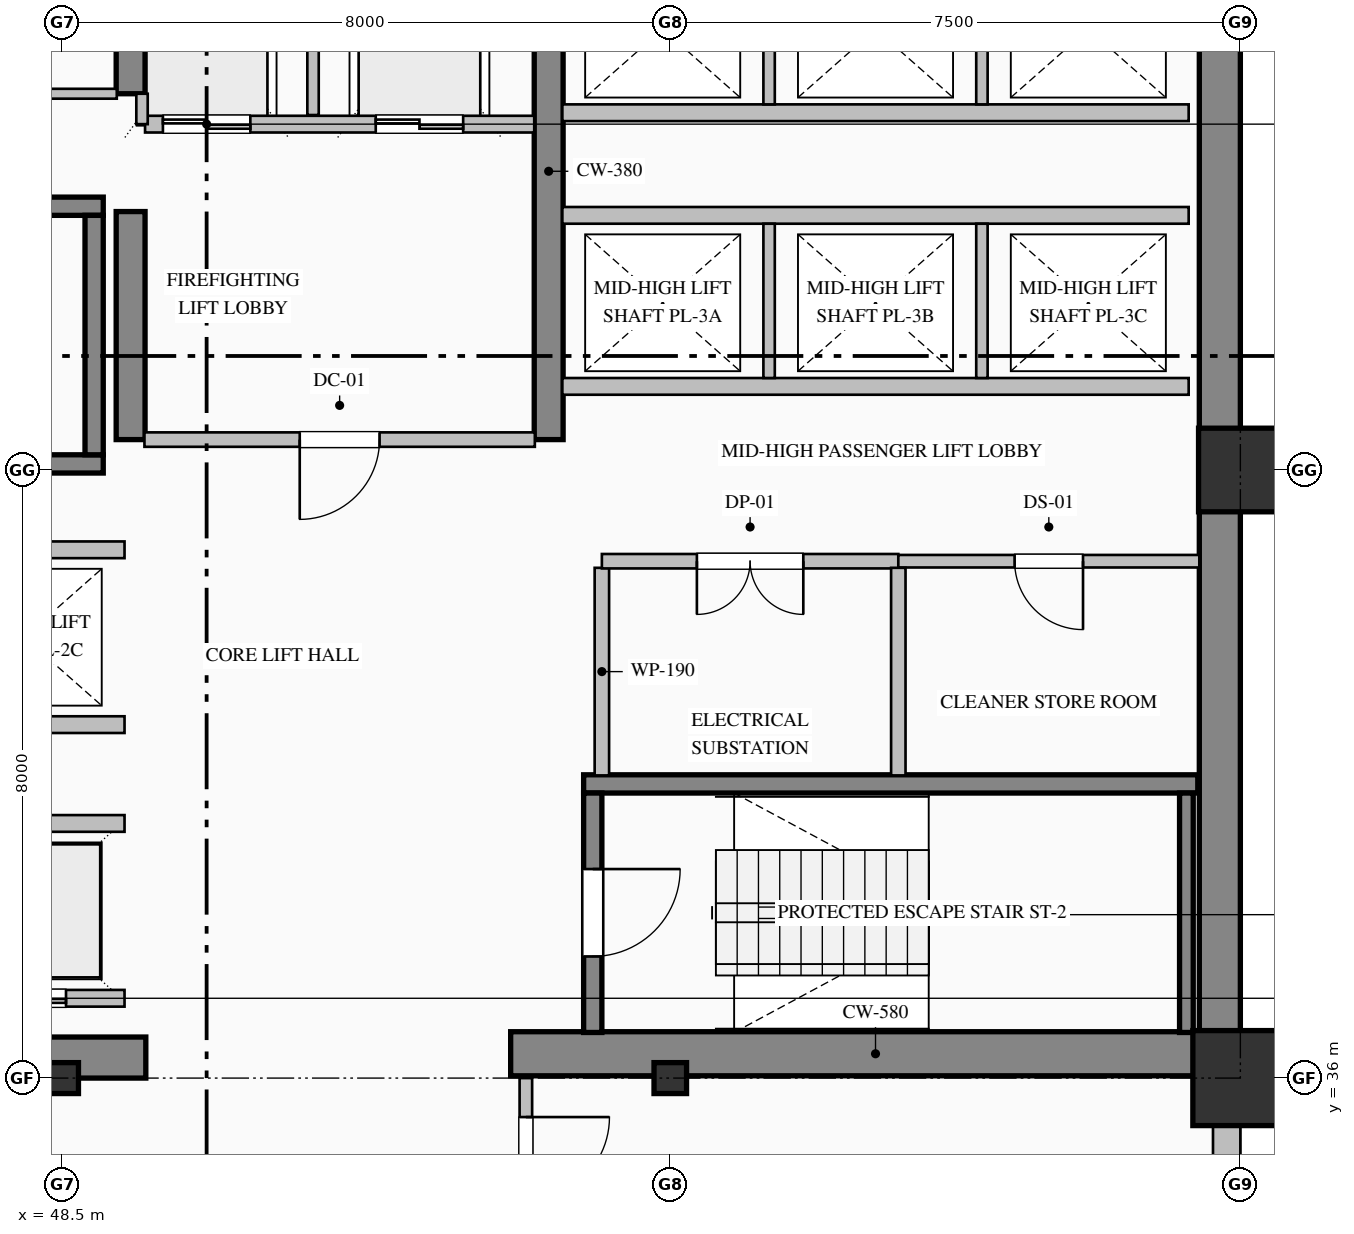
"""IFC4 building model, lengths in metres.
Left out: names, types, materials, properties, quantities, classifications, styles, units other than length and angle.
Written with IfcOpenShell. Run it as: python <this file> out.ifc"""

import sys

from ifc_helpers import new_model, si_unit, direction, frame, frame_2d, origin, origin_2d, place, context, subcontext, project, spatial, rectangle, hollow_rectangle, i_section, extrude, element, fill, save


model = new_model("IFC4")
c1 = context("Model", 3, precision=1e-05, world=origin(), true_north=direction((0.0, 1.0)))
c2 = subcontext(c1, "Body", "Model", "MODEL_VIEW")
j1 = project(units=[si_unit("LENGTHUNIT", "METRE"), si_unit("PLANEANGLEUNIT", "RADIAN")], contexts=[c1])
p1 = place(None, origin())
s1 = spatial("IfcSite", under=j1, at=p1, CompositionType="ELEMENT")
p2 = place(p1, origin())
s2 = spatial("IfcBuilding", under=s1, at=p2, CompositionType="ELEMENT")
p3 = place(p2, frame((0.0, 0.0, 36.2)))
s3 = spatial("IfcBuildingStorey", under=s2, at=p3, CompositionType="ELEMENT", Elevation=36.2)
p4 = place(p3, frame((63.73, 36.32, 0.0), z_axis=(0.0, 0.0, 1.0), x_axis=(0.0, 1.0, 0.0)))
e1 = element("IfcWall", 1, at=p4, inside=s3, PredefinedType="SHEAR", context=c2, shape_type="SweptSolid", body=[
    extrude(rectangle(XDim=15.14, YDim=0.54, at=frame_2d((7.57, 0.0))), origin(), (0.0, 0.0, 1.0), 3.75),
])
p5 = place(p3, frame((48.2, 36.27, 0.0), z_axis=(0.0, 0.0, 1.0), x_axis=(1.0, 0.0, 0.0)))
e2 = element("IfcWall", 2, at=p5, inside=s3, PredefinedType="SHEAR", context=c2, shape_type="SweptSolid", body=[
    extrude(rectangle(XDim=1.4, YDim=0.54, at=frame_2d((0.7, 0.0))), origin(), (0.0, 0.0, 1.0), 3.75),
])
p6 = place(p3, frame((54.4, 36.32, 0.0), z_axis=(0.0, 0.0, 1.0), x_axis=(1.0, 0.0, 0.0)))
e3 = element("IfcWall", 3, at=p6, inside=s3, PredefinedType="SHEAR", context=c2, shape_type="SweptSolid", body=[
    extrude(rectangle(XDim=9.6, YDim=0.58, at=frame_2d((4.8, 0.0))), origin(), (0.0, 0.0, 1.0), 4.0),
])
p7 = place(p3, frame((49.4, 44.4, 0.0), z_axis=(0.0, 0.0, 1.0), x_axis=(0.0, 1.0, 0.0)))
e4 = element("IfcWall", 4, at=p7, inside=s3, PredefinedType="SHEAR", context=c2, shape_type="SweptSolid", body=[
    extrude(rectangle(XDim=3.0, YDim=0.38, at=frame_2d((1.5, 0.0))), origin(), (0.0, 0.0, 1.0), 3.75),
])
p8 = place(p3, frame((49.4, 48.95, 0.0), z_axis=(0.0, 0.0, 1.0), x_axis=(0.0, 1.0, 0.0)))
e5 = element("IfcWall", 5, at=p8, inside=s3, PredefinedType="SHEAR", context=c2, shape_type="SweptSolid", body=[
    extrude(rectangle(XDim=2.51, YDim=0.38, at=frame_2d((1.255, 0.0))), origin(), (0.0, 0.0, 1.0), 3.75),
])
p9 = place(p3, frame((54.9, 44.4, 0.0), z_axis=(0.0, 0.0, 1.0), x_axis=(0.0, 1.0, 0.0)))
e6 = element("IfcWall", 6, at=p9, inside=s3, PredefinedType="SHEAR", context=c2, shape_type="SweptSolid", body=[
    extrude(rectangle(XDim=7.06, YDim=0.38, at=frame_2d((3.53, 0.0))), origin(), (0.0, 0.0, 1.0), 3.75),
])
for number, where, z_axis, x_axis in (
    (7, (48.5, 36.0, 0.0), (0.0, 0.0, 1.0), (1.0, 0.0, 0.0)),
    (8, (56.5, 36.0, 0.0), (0.0, 0.0, 1.0), (1.0, 0.0, 0.0)),
):
    element("IfcColumn", number, at=place(p3, frame(where, z_axis=z_axis, x_axis=x_axis)), inside=s3, PredefinedType="COLUMN", context=c2, shape_type="SweptSolid", body=[
        extrude(i_section(OverallWidth=0.407, OverallDepth=0.428, WebThickness=0.02, FlangeThickness=0.035, FilletRadius=0.022, at=origin_2d()), origin(), (0.0, 0.0, 1.0), 4.0),
    ])
p10 = place(p3, frame((64.0, 36.0, 0.0), z_axis=(0.0, 0.0, 1.0), x_axis=(1.0, 0.0, 0.0)))
e9 = element("IfcColumn", 9, at=p10, inside=s3, PredefinedType="COLUMN", context=c2, shape_type="SweptSolid", body=[
    extrude(hollow_rectangle(XDim=1.25, YDim=1.25, WallThickness=0.045, at=origin_2d()), origin(), (0.0, 0.0, 1.0), 4.0),
])
p11 = place(p3, frame((64.0, 44.0, 0.0), z_axis=(0.0, 0.0, 1.0), x_axis=(1.0, 0.0, 0.0)))
e10 = element("IfcColumn", 10, at=p11, inside=s3, PredefinedType="COLUMN", context=c2, shape_type="SweptSolid", body=[
    extrude(hollow_rectangle(XDim=1.1, YDim=1.1, WallThickness=0.04, at=origin_2d()), origin(), (0.0, 0.0, 1.0), 4.0),
])
p12 = place(p3, frame((63.82, 36.05, 0.0), z_axis=(0.0, 0.0, 1.0), x_axis=(0.0, -1.0, 0.0)))
e11 = element("IfcWall", 11, at=p12, inside=s3, PredefinedType="SOLIDWALL", context=c2, shape_type="SweptSolid", body=[
    extrude(rectangle(XDim=28.05, YDim=0.36, at=frame_2d((14.025, 0.0))), origin(), (0.0, 0.0, 1.0), 3.25),
])
p13 = place(p12, frame((9.75, 0.0, 0.85)))
e12 = element("IfcOpeningElement", 12, at=p13, cuts=e11, PredefinedType="OPENING", context=c2, shape_type="SweptSolid", body=[
    extrude(rectangle(XDim=2.1, YDim=2.05, at=frame_2d((1.05, 1.025))), frame((0.0, 0.19, 0.0), z_axis=(0.0, -1.0, 0.0), x_axis=(1.0, 0.0, 0.0)), (0.0, 0.0, 1.0), 0.38),
])
p14 = place(p12, frame((13.2, 0.0, 0.8)))
e13 = element("IfcOpeningElement", 13, at=p14, cuts=e11, PredefinedType="OPENING", context=c2, shape_type="SweptSolid", body=[
    extrude(rectangle(XDim=2.4, YDim=2.15, at=frame_2d((1.2, 1.075))), frame((0.0, 0.19, 0.0), z_axis=(0.0, -1.0, 0.0), x_axis=(1.0, 0.0, 0.0)), (0.0, 0.0, 1.0), 0.38),
])
for number, where, z_axis, x_axis in (
    (14, (40.96, 47.47, 0.0), (0.0, 0.0, 1.0), (1.0, 0.0, 0.0)),
    (15, (49.04, 44.08, 0.0), (0.0, 0.0, 1.0), (-1.0, 0.0, 0.0)),
):
    element("IfcWall", number, at=place(p3, frame(where, z_axis=z_axis, x_axis=x_axis)), inside=s3, PredefinedType="SOLIDWALL", context=c2, shape_type="SweptSolid", body=[
        extrude(rectangle(XDim=8.08, YDim=0.24, at=frame_2d((4.04, 0.0))), origin(), (0.0, 0.0, 1.0), 4.0),
    ])
p15 = place(p3, frame((48.92, 44.2, 0.0), z_axis=(0.0, 0.0, 1.0), x_axis=(0.0, 1.0, 0.0)))
e16 = element("IfcWall", 16, at=p15, inside=s3, PredefinedType="SOLIDWALL", context=c2, shape_type="SweptSolid", body=[
    extrude(rectangle(XDim=3.15, YDim=0.24, at=frame_2d((1.575, 0.0))), origin(), (0.0, 0.0, 1.0), 4.0),
])
p16 = place(p3, frame((55.36, 39.87, 0.0), z_axis=(0.0, 0.0, 1.0), x_axis=(1.0, 0.0, 0.0)))
e17 = element("IfcWall", 17, at=p16, inside=s3, PredefinedType="SOLIDWALL", context=c2, shape_type="SweptSolid", body=[
    extrude(rectangle(XDim=8.08, YDim=0.24, at=frame_2d((4.04, 0.0))), origin(), (0.0, 0.0, 1.0), 4.0),
])
p17 = place(p3, frame((55.48, 39.75, 0.0), z_axis=(0.0, 0.0, 1.0), x_axis=(0.0, -1.0, 0.0)))
e18 = element("IfcWall", 18, at=p17, inside=s3, PredefinedType="SOLIDWALL", context=c2, shape_type="SweptSolid", body=[
    extrude(rectangle(XDim=3.15, YDim=0.24, at=frame_2d((1.575, 0.0))), origin(), (0.0, 0.0, 1.0), 4.0),
])
p18 = place(p17, frame((1.0, 0.0, 0.0)))
e19 = element("IfcOpeningElement", 19, at=p18, cuts=e18, PredefinedType="OPENING", context=c2, shape_type="SweptSolid", body=[
    extrude(rectangle(XDim=1.15, YDim=2.2, at=frame_2d((0.575, 1.1))), frame((0.0, 0.13, 0.0), z_axis=(0.0, -1.0, 0.0), x_axis=(1.0, 0.0, 0.0)), (0.0, 0.0, 1.0), 0.26),
])
p19 = place(p3, frame((63.29, 36.6, 0.0), z_axis=(0.0, 0.0, 1.0), x_axis=(0.0, 1.0, 0.0)))
e20 = element("IfcWall", 20, at=p19, inside=s3, PredefinedType="SOLIDWALL", context=c2, shape_type="SweptSolid", body=[
    extrude(rectangle(XDim=3.15, YDim=0.18, at=frame_2d((1.575, 0.0))), origin(), (0.0, 0.0, 1.0), 4.0),
])
p20 = place(p3, frame((54.71, 48.55, 0.0), z_axis=(0.0, 0.0, 1.0), x_axis=(-1.0, 0.0, 0.0)))
e21 = element("IfcWall", 21, at=p20, inside=s3, PredefinedType="PARTITIONING", context=c2, shape_type="SweptSolid", body=[
    extrude(rectangle(XDim=5.12, YDim=0.22, at=frame_2d((2.56, 0.0))), origin(), (0.0, 0.0, 1.0), 3.75),
])
p21 = place(p20, frame((3.735, 0.0, 0.0)))
e22 = element("IfcOpeningElement", 22, at=p21, cuts=e21, PredefinedType="OPENING", context=c2, shape_type="SweptSolid", body=[
    extrude(rectangle(XDim=1.15, YDim=2.2, at=frame_2d((0.575, 1.1))), frame((0.0, 0.12, 0.0), z_axis=(0.0, -1.0, 0.0), x_axis=(1.0, 0.0, 0.0)), (0.0, 0.0, 1.0), 0.24),
])
p22 = place(p20, frame((0.935, 0.0, 0.0)))
e23 = element("IfcOpeningElement", 23, at=p22, cuts=e21, PredefinedType="OPENING", context=c2, shape_type="SweptSolid", body=[
    extrude(rectangle(XDim=1.15, YDim=2.2, at=frame_2d((0.575, 1.1))), frame((0.0, 0.12, 0.0), z_axis=(0.0, -1.0, 0.0), x_axis=(1.0, 0.0, 0.0)), (0.0, 0.0, 1.0), 0.24),
])
p23 = place(p3, frame((51.8, 48.67, 0.0), z_axis=(0.0, 0.0, 1.0), x_axis=(0.0, 1.0, 0.0)))
e24 = element("IfcWall", 24, at=p23, inside=s3, PredefinedType="PARTITIONING", context=c2, shape_type="SweptSolid", body=[
    extrude(rectangle(XDim=2.79, YDim=0.15, at=frame_2d((1.395, 0.0))), origin(), (0.0, 0.0, 1.0), 3.75),
])
p24 = place(p3, frame((49.55, 48.55, 0.0), z_axis=(0.0, 0.0, 1.0), x_axis=(0.0, 1.0, 0.0)))
e25 = element("IfcWall", 25, at=p24, inside=s3, PredefinedType="PARTITIONING", context=c2, shape_type="SweptSolid", body=[
    extrude(rectangle(XDim=0.4, YDim=0.15, at=frame_2d((0.2, 0.0))), origin(), (0.0, 0.0, 1.0), 3.75),
])
p25 = place(p3, frame((49.32, 37.05, 0.0), z_axis=(0.0, 0.0, 1.0), x_axis=(-1.0, 0.0, 0.0)))
e26 = element("IfcWall", 26, at=p25, inside=s3, PredefinedType="PARTITIONING", context=c2, shape_type="SweptSolid", body=[
    extrude(rectangle(XDim=8.24, YDim=0.22, at=frame_2d((4.12, 0.0))), origin(), (0.0, 0.0, 1.0), 3.75),
])
p26 = place(p25, frame((6.37, 0.0, 0.0)))
e27 = element("IfcOpeningElement", 27, at=p26, cuts=e26, PredefinedType="OPENING", context=c2, shape_type="SweptSolid", body=[
    extrude(rectangle(XDim=1.1, YDim=2.2, at=frame_2d((0.55, 1.1))), frame((0.0, 0.12, 0.0), z_axis=(0.0, -1.0, 0.0), x_axis=(1.0, 0.0, 0.0)), (0.0, 0.0, 1.0), 0.24),
])
p27 = place(p25, frame((3.57, 0.0, 0.0)))
e28 = element("IfcOpeningElement", 28, at=p27, cuts=e26, PredefinedType="OPENING", context=c2, shape_type="SweptSolid", body=[
    extrude(rectangle(XDim=1.1, YDim=2.2, at=frame_2d((0.55, 1.1))), frame((0.0, 0.12, 0.0), z_axis=(0.0, -1.0, 0.0), x_axis=(1.0, 0.0, 0.0)), (0.0, 0.0, 1.0), 0.24),
])
p28 = place(p25, frame((0.77, 0.0, 0.0)))
e29 = element("IfcOpeningElement", 29, at=p28, cuts=e26, PredefinedType="OPENING", context=c2, shape_type="SweptSolid", body=[
    extrude(rectangle(XDim=1.1, YDim=2.2, at=frame_2d((0.55, 1.1))), frame((0.0, 0.12, 0.0), z_axis=(0.0, -1.0, 0.0), x_axis=(1.0, 0.0, 0.0)), (0.0, 0.0, 1.0), 0.24),
])
for number, where, z_axis, x_axis in (
    (30, (41.08, 39.35, 0.0), (0.0, 0.0, 1.0), (1.0, 0.0, 0.0)),
    (31, (49.32, 40.65, 0.0), (0.0, 0.0, 1.0), (-1.0, 0.0, 0.0)),
    (32, (41.08, 42.95, 0.0), (0.0, 0.0, 1.0), (1.0, 0.0, 0.0)),
    (33, (63.32, 45.1, 0.0), (0.0, 0.0, 1.0), (-1.0, 0.0, 0.0)),
    (34, (55.08, 47.35, 0.0), (0.0, 0.0, 1.0), (1.0, 0.0, 0.0)),
):
    element("IfcWall", number, at=place(p3, frame(where, z_axis=z_axis, x_axis=x_axis)), inside=s3, PredefinedType="PARTITIONING", context=c2, shape_type="SweptSolid", body=[
        extrude(rectangle(XDim=8.24, YDim=0.22, at=frame_2d((4.12, 0.0))), origin(), (0.0, 0.0, 1.0), 3.75),
    ])
for number, where, z_axis, x_axis in (
    (35, (57.8, 45.21, 0.0), (0.0, 0.0, 1.0), (0.0, 1.0, 0.0)),
    (36, (60.6, 45.21, 0.0), (0.0, 0.0, 1.0), (0.0, 1.0, 0.0)),
):
    element("IfcWall", number, at=place(p3, frame(where, z_axis=z_axis, x_axis=x_axis)), inside=s3, PredefinedType="PARTITIONING", context=c2, shape_type="SweptSolid", body=[
        extrude(rectangle(XDim=2.03, YDim=0.15, at=frame_2d((1.015, 0.0))), origin(), (0.0, 0.0, 1.0), 3.75),
    ])
p29 = place(p3, frame((63.32, 48.7, 0.0), z_axis=(0.0, 0.0, 1.0), x_axis=(-1.0, 0.0, 0.0)))
e37 = element("IfcWall", 37, at=p29, inside=s3, PredefinedType="PARTITIONING", context=c2, shape_type="SweptSolid", body=[
    extrude(rectangle(XDim=8.24, YDim=0.22, at=frame_2d((4.12, 0.0))), origin(), (0.0, 0.0, 1.0), 3.75),
])
for number, where, z_axis, x_axis in (
    (38, (57.8, 48.81, 0.0), (0.0, 0.0, 1.0), (0.0, 1.0, 0.0)),
    (39, (60.6, 48.81, 0.0), (0.0, 0.0, 1.0), (0.0, 1.0, 0.0)),
):
    element("IfcWall", number, at=place(p3, frame(where, z_axis=z_axis, x_axis=x_axis)), inside=s3, PredefinedType="PARTITIONING", context=c2, shape_type="SweptSolid", body=[
        extrude(rectangle(XDim=2.65, YDim=0.15, at=frame_2d((1.325, 0.0))), origin(), (0.0, 0.0, 1.0), 3.75),
    ])
p30 = place(p3, frame((45.2, 48.95, 0.0), z_axis=(0.0, 0.0, 1.0), x_axis=(1.0, 0.0, 0.0)))
e40 = element("IfcWall", 40, at=p30, inside=s3, PredefinedType="PARTITIONING", context=c2, shape_type="SweptSolid", body=[
    extrude(rectangle(XDim=4.018, YDim=0.13, at=frame_2d((2.009, 0.0))), origin(), (0.0, 0.0, 1.0), 3.75),
])
p31 = place(p30, frame((1.549, 0.0, 0.0)))
e41 = element("IfcOpeningElement", 41, at=p31, cuts=e40, PredefinedType="OPENING", context=c2, shape_type="SweptSolid", body=[
    extrude(rectangle(XDim=0.92, YDim=2.15, at=frame_2d((0.46, 1.075))), frame((0.0, 0.075, 0.0), z_axis=(0.0, -1.0, 0.0), x_axis=(1.0, 0.0, 0.0)), (0.0, 0.0, 1.0), 0.15),
])
p32 = place(p3, frame((54.718, 44.4, 0.0), z_axis=(0.0, 0.0, 1.0), x_axis=(-1.0, 0.0, 0.0)))
e42 = element("IfcWall", 42, at=p32, inside=s3, PredefinedType="PARTITIONING", context=c2, shape_type="SweptSolid", body=[
    extrude(rectangle(XDim=5.136, YDim=0.19, at=frame_2d((2.568, 0.0))), origin(), (0.0, 0.0, 1.0), 3.75),
])
p33 = place(p32, frame((2.043, 0.0, 0.0)))
e43 = element("IfcOpeningElement", 43, at=p33, cuts=e42, PredefinedType="OPENING", context=c2, shape_type="SweptSolid", body=[
    extrude(rectangle(XDim=1.05, YDim=2.15, at=frame_2d((0.525, 1.075))), frame((0.0, 0.105, 0.0), z_axis=(0.0, -1.0, 0.0), x_axis=(1.0, 0.0, 0.0)), (0.0, 0.0, 1.0), 0.21),
])
p34 = place(p3, frame((55.6, 42.713, 0.0), z_axis=(0.0, 0.0, 1.0), x_axis=(0.0, -1.0, 0.0)))
e44 = element("IfcWall", 44, at=p34, inside=s3, PredefinedType="PARTITIONING", context=c2, shape_type="SweptSolid", body=[
    extrude(rectangle(XDim=2.731, YDim=0.19, at=frame_2d((1.365, 0.0))), origin(), (0.0, 0.0, 1.0), 3.75),
])
p35 = place(p3, frame((59.5, 42.8, 0.0), z_axis=(0.0, 0.0, 1.0), x_axis=(-1.0, 0.0, 0.0)))
e45 = element("IfcWall", 45, at=p35, inside=s3, PredefinedType="PARTITIONING", context=c2, shape_type="SweptSolid", body=[
    extrude(rectangle(XDim=3.9, YDim=0.19, at=frame_2d((1.95, 0.0))), origin(), (0.0, 0.0, 1.0), 3.75),
])
p36 = place(p35, frame((1.25, 0.0, 0.0)))
e46 = element("IfcOpeningElement", 46, at=p36, cuts=e45, PredefinedType="OPENING", context=c2, shape_type="SweptSolid", body=[
    extrude(rectangle(XDim=1.4, YDim=2.25, at=frame_2d((0.7, 1.125))), frame((0.0, 0.105, 0.0), z_axis=(0.0, -1.0, 0.0), x_axis=(1.0, 0.0, 0.0)), (0.0, 0.0, 1.0), 0.21),
])
p37 = place(p3, frame((63.46, 42.8, 0.0), z_axis=(0.0, 0.0, 1.0), x_axis=(-1.0, 0.0, 0.0)))
e47 = element("IfcWall", 47, at=p37, inside=s3, PredefinedType="PARTITIONING", context=c2, shape_type="SweptSolid", body=[
    extrude(rectangle(XDim=3.96, YDim=0.165, at=frame_2d((1.98, 0.0))), origin(), (0.0, 0.0, 1.0), 3.75),
])
p38 = place(p37, frame((1.53, 0.0, 0.0)))
e48 = element("IfcOpeningElement", 48, at=p38, cuts=e47, PredefinedType="OPENING", context=c2, shape_type="SweptSolid", body=[
    extrude(rectangle(XDim=0.9, YDim=2.15, at=frame_2d((0.45, 1.075))), frame((0.0, 0.093, 0.0), z_axis=(0.0, -1.0, 0.0), x_axis=(1.0, 0.0, 0.0)), (0.0, 0.0, 1.0), 0.185),
])
p39 = place(p3, frame((59.5, 42.713, 0.0), z_axis=(0.0, 0.0, 1.0), x_axis=(0.0, -1.0, 0.0)))
e49 = element("IfcWall", 49, at=p39, inside=s3, PredefinedType="PARTITIONING", context=c2, shape_type="SweptSolid", body=[
    extrude(rectangle(XDim=2.731, YDim=0.19, at=frame_2d((1.365, 0.0))), origin(), (0.0, 0.0, 1.0), 3.75),
])
p40 = place(p3, frame((54.6, 36.0, 0.0), z_axis=(0.0, 0.0, 1.0), x_axis=(0.0, -1.0, 0.0)))
e50 = element("IfcWall", 50, at=p40, inside=s3, PredefinedType="PARTITIONING", context=c2, shape_type="SweptSolid", body=[
    extrude(rectangle(XDim=2.125, YDim=0.165, at=frame_2d((1.063, 0.0))), origin(), (0.0, 0.0, 1.0), 3.75),
])
p41 = place(p40, frame((0.513, 0.0, 0.0)))
e51 = element("IfcOpeningElement", 51, at=p41, cuts=e50, PredefinedType="OPENING", context=c2, shape_type="SweptSolid", body=[
    extrude(rectangle(XDim=1.1, YDim=2.2, at=frame_2d((0.55, 1.1))), frame((0.0, 0.093, 0.0), z_axis=(0.0, -1.0, 0.0), x_axis=(1.0, 0.0, 0.0)), (0.0, 0.0, 1.0), 0.185),
])
p42 = place(p18, origin())
e52 = element("IfcDoor", 52, at=p42, inside=s3, OperationType="SINGLE_SWING_LEFT", PredefinedType="DOOR", context=c2, shape_type="SweptSolid", body=[
    extrude(rectangle(XDim=1.15, YDim=2.2, at=frame_2d((0.575, 1.1))), frame((0.0, 0.025, 0.0), z_axis=(0.0, -1.0, 0.0), x_axis=(1.0, 0.0, 0.0)), (0.0, 0.0, 1.0), 0.05),
])
fill(e19, e52)
p43 = place(p21, origin())
e53 = element("IfcDoor", 53, at=p43, inside=s3, OperationType="DOUBLE_DOOR_SLIDING", PredefinedType="DOOR", context=c2, shape_type="SweptSolid", body=[
    extrude(rectangle(XDim=1.15, YDim=2.2, at=frame_2d((0.575, 1.1))), frame((0.0, 0.025, 0.0), z_axis=(0.0, -1.0, 0.0), x_axis=(1.0, 0.0, 0.0)), (0.0, 0.0, 1.0), 0.05),
])
fill(e22, e53)
p44 = place(p22, origin())
e54 = element("IfcDoor", 54, at=p44, inside=s3, OperationType="DOUBLE_DOOR_SLIDING", PredefinedType="DOOR", context=c2, shape_type="SweptSolid", body=[
    extrude(rectangle(XDim=1.15, YDim=2.2, at=frame_2d((0.575, 1.1))), frame((0.0, 0.025, 0.0), z_axis=(0.0, -1.0, 0.0), x_axis=(1.0, 0.0, 0.0)), (0.0, 0.0, 1.0), 0.05),
])
fill(e23, e54)
p45 = place(p28, origin())
e55 = element("IfcDoor", 55, at=p45, inside=s3, OperationType="DOUBLE_DOOR_SLIDING", PredefinedType="DOOR", context=c2, shape_type="SweptSolid", body=[
    extrude(rectangle(XDim=1.1, YDim=2.2, at=frame_2d((0.55, 1.1))), frame((0.0, 0.025, 0.0), z_axis=(0.0, -1.0, 0.0), x_axis=(1.0, 0.0, 0.0)), (0.0, 0.0, 1.0), 0.05),
])
fill(e29, e55)
p46 = place(p33, origin())
e56 = element("IfcDoor", 56, at=p46, inside=s3, OperationType="SINGLE_SWING_RIGHT", PredefinedType="DOOR", context=c2, shape_type="SweptSolid", body=[
    extrude(rectangle(XDim=1.05, YDim=2.15, at=frame_2d((0.525, 1.075))), frame((0.0, 0.025, 0.0), z_axis=(0.0, -1.0, 0.0), x_axis=(1.0, 0.0, 0.0)), (0.0, 0.0, 1.0), 0.05),
])
fill(e43, e56)
p47 = place(p36, origin())
e57 = element("IfcDoor", 57, at=p47, inside=s3, OperationType="DOUBLE_DOOR_SINGLE_SWING", PredefinedType="DOOR", context=c2, shape_type="SweptSolid", body=[
    extrude(rectangle(XDim=1.4, YDim=2.25, at=frame_2d((0.7, 1.125))), frame((0.0, 0.025, 0.0), z_axis=(0.0, -1.0, 0.0), x_axis=(1.0, 0.0, 0.0)), (0.0, 0.0, 1.0), 0.05),
])
fill(e46, e57)
p48 = place(p38, origin())
e58 = element("IfcDoor", 58, at=p48, inside=s3, OperationType="SINGLE_SWING_LEFT", PredefinedType="DOOR", context=c2, shape_type="SweptSolid", body=[
    extrude(rectangle(XDim=0.9, YDim=2.15, at=frame_2d((0.45, 1.075))), frame((0.0, 0.025, 0.0), z_axis=(0.0, -1.0, 0.0), x_axis=(1.0, 0.0, 0.0)), (0.0, 0.0, 1.0), 0.05),
])
fill(e48, e58)
p49 = place(p41, origin())
e59 = element("IfcDoor", 59, at=p49, inside=s3, OperationType="SINGLE_SWING_LEFT", PredefinedType="DOOR", context=c2, shape_type="SweptSolid", body=[
    extrude(rectangle(XDim=1.1, YDim=2.2, at=frame_2d((0.55, 1.1))), frame((0.0, 0.025, 0.0), z_axis=(0.0, -1.0, 0.0), x_axis=(1.0, 0.0, 0.0)), (0.0, 0.0, 1.0), 0.05),
])
fill(e51, e59)
save(model, sys.argv[1])
